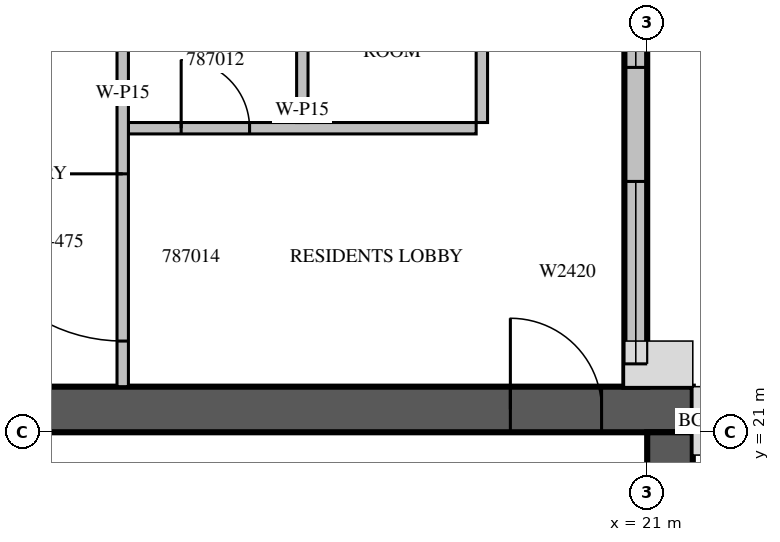
"""IFC4 building model, lengths in metres.
Left out: names, types, materials, properties, quantities, classifications, styles, units other than length and angle.
Written with IfcOpenShell. Run it as: python <this file> out.ifc"""

import sys

from ifc_helpers import new_model, si_unit, direction, frame, frame_2d, origin, place, context, subcontext, project, spatial, rectangle, extrude, source, transform, mapped, element, fill, save


model = new_model("IFC4")
c1 = context("Model", 3, precision=1e-05, world=origin(), true_north=direction((0.0, 1.0)))
c2 = subcontext(c1, "Body", "Model", "MODEL_VIEW")
j1 = project(units=[si_unit("LENGTHUNIT", "METRE"), si_unit("PLANEANGLEUNIT", "RADIAN")], contexts=[c1])
p1 = place(None, origin())
s1 = spatial("IfcSite", under=j1, at=p1, CompositionType="ELEMENT")
p2 = place(p1, origin())
s2 = spatial("IfcBuilding", under=s1, at=p2, CompositionType="ELEMENT")
p3 = place(p2, frame((0.0, 0.0, 365.0)))
s3 = spatial("IfcBuildingStorey", under=s2, at=p3, CompositionType="ELEMENT", Elevation=365.0)
m1 = source(origin(), c2, "Body", "SweptSolid", [
    extrude(rectangle(XDim=11.1, YDim=0.6, at=frame_2d((5.55, 0.0))), origin(), (0.0, 0.0, 1.0), 3.5),
])
p4 = place(p3, frame((10.5, 21.3, 0.0), z_axis=(0.0, 0.0, 1.0), x_axis=(1.0, 0.0, 0.0)))
e1 = element("IfcWall", 1, at=p4, inside=s3, PredefinedType="SHEAR", context=c2, shape_type="MappedRepresentation", body=[
    mapped(m1, transform((0.0, 0.0, 0.0), scale=1.0)),
])
m2 = source(origin(), c2, "Body", "SweptSolid", [
    extrude(rectangle(XDim=1.2, YDim=2.1, at=frame_2d((0.6, 1.05))), frame((0.0, 0.31, 0.0), z_axis=(0.0, -1.0, 0.0), x_axis=(1.0, 0.0, 0.0)), (0.0, 0.0, 1.0), 0.62),
])
p5 = place(p4, frame((8.7, 0.0, 0.0)))
e2 = element("IfcOpeningElement", 2, at=p5, cuts=e1, PredefinedType="OPENING", context=c2, shape_type="MappedRepresentation", body=[
    mapped(m2, transform((0.0, 0.0, 0.0), scale=1.0)),
])
m3 = source(origin(), c2, "Body", "SweptSolid", [
    extrude(rectangle(XDim=10.5, YDim=0.6, at=frame_2d((5.25, 0.0))), origin(), (0.0, 0.0, 1.0), 3.5),
])
p6 = place(p3, frame((21.3, 10.5, 0.0), z_axis=(0.0, 0.0, 1.0), x_axis=(0.0, 1.0, 0.0)))
e3 = element("IfcWall", 3, at=p6, inside=s3, PredefinedType="SHEAR", context=c2, shape_type="MappedRepresentation", body=[
    mapped(m3, transform((0.0, 0.0, 0.0), scale=1.0)),
])
m4 = source(origin(), c2, "Body", "SweptSolid", [
    extrude(rectangle(XDim=1.2, YDim=2.4, at=frame_2d((0.6, 1.2))), frame((0.0, 0.31, 0.0), z_axis=(0.0, -1.0, 0.0), x_axis=(1.0, 0.0, 0.0)), (0.0, 0.0, 1.0), 0.62),
])
p7 = place(p6, frame((5.7, 0.0, 0.6)))
e4 = element("IfcOpeningElement", 4, at=p7, cuts=e3, PredefinedType="OPENING", context=c2, shape_type="MappedRepresentation", body=[
    mapped(m4, transform((0.0, 0.0, 0.0), scale=1.0)),
])
m5 = source(origin(), c2, "Body", "SweptSolid", [
    extrude(rectangle(XDim=7.5, YDim=0.3, at=frame_2d((3.75, 0.0))), origin(), (0.0, 0.0, 1.0), 3.05),
])
p8 = place(p3, frame((20.85, 21.6, 0.0), z_axis=(0.0, 0.0, 1.0), x_axis=(0.0, 1.0, 0.0)))
e5 = element("IfcWall", 5, at=p8, inside=s3, PredefinedType="STANDARD", context=c2, shape_type="MappedRepresentation", body=[
    mapped(m5, transform((0.0, 0.0, 0.0), scale=1.0)),
])
m6 = source(origin(), c2, "Body", "SweptSolid", [
    extrude(rectangle(XDim=2.4, YDim=2.0, at=frame_2d((1.2, 1.0))), frame((0.0, 0.16, 0.0), z_axis=(0.0, -1.0, 0.0), x_axis=(1.0, 0.0, 0.0)), (0.0, 0.0, 1.0), 0.32),
])
p9 = place(p8, frame((0.3, 0.0, 0.6)))
e6 = element("IfcOpeningElement", 6, at=p9, cuts=e5, PredefinedType="OPENING", context=c2, shape_type="MappedRepresentation", body=[
    mapped(m6, transform((0.0, 0.0, 0.0), scale=1.0)),
])
m7 = source(origin(), c2, "Body", "SweptSolid", [
    extrude(rectangle(XDim=3.0, YDim=2.0, at=frame_2d((1.5, 1.0))), frame((0.0, 0.16, 0.0), z_axis=(0.0, -1.0, 0.0), x_axis=(1.0, 0.0, 0.0)), (0.0, 0.0, 1.0), 0.32),
])
p10 = place(p8, frame((4.2, 0.0, 0.6)))
e7 = element("IfcOpeningElement", 7, at=p10, cuts=e5, PredefinedType="OPENING", context=c2, shape_type="MappedRepresentation", body=[
    mapped(m7, transform((0.0, 0.0, 0.0), scale=1.0)),
])
m8 = source(origin(), c2, "Body", "SweptSolid", [
    extrude(rectangle(XDim=4.575, YDim=0.15, at=frame_2d((2.288, 0.0))), origin(), (0.0, 0.0, 1.0), 3.05),
])
p11 = place(p3, frame((14.175, 25.0, 0.0), z_axis=(0.0, 0.0, 1.0), x_axis=(1.0, 0.0, 0.0)))
e8 = element("IfcWall", 8, at=p11, inside=s3, PredefinedType="PARTITIONING", context=c2, shape_type="MappedRepresentation", body=[
    mapped(m8, transform((0.0, 0.0, 0.0), scale=1.0)),
])
m9 = source(origin(), c2, "Body", "SweptSolid", [
    extrude(rectangle(XDim=0.9, YDim=2.1, at=frame_2d((0.45, 1.05))), frame((0.0, 0.085, 0.0), z_axis=(0.0, -1.0, 0.0), x_axis=(1.0, 0.0, 0.0)), (0.0, 0.0, 1.0), 0.17),
])
p12 = place(p11, frame((0.694, 0.0, 0.0)))
e9 = element("IfcOpeningElement", 9, at=p12, cuts=e8, PredefinedType="OPENING", context=c2, shape_type="MappedRepresentation", body=[
    mapped(m9, transform((0.0, 0.0, 0.0), scale=1.0)),
])
m10 = source(origin(), c2, "Body", "SweptSolid", [
    extrude(rectangle(XDim=4.25, YDim=0.15, at=frame_2d((2.125, 0.0))), origin(), (0.0, 0.0, 1.0), 3.05),
])
p13 = place(p3, frame((18.825, 25.075, 0.0), z_axis=(0.0, 0.0, 1.0), x_axis=(0.0, 1.0, 0.0)))
e10 = element("IfcWall", 10, at=p13, inside=s3, PredefinedType="PARTITIONING", context=c2, shape_type="MappedRepresentation", body=[
    mapped(m10, transform((0.0, 0.0, 0.0), scale=1.0)),
])
m11 = source(origin(), c2, "Body", "SweptSolid", [
    extrude(rectangle(XDim=1.0, YDim=2.1, at=frame_2d((0.5, 1.05))), frame((0.0, 0.085, 0.0), z_axis=(0.0, -1.0, 0.0), x_axis=(1.0, 0.0, 0.0)), (0.0, 0.0, 1.0), 0.17),
])
p14 = place(p13, frame((1.625, 0.0, 0.0)))
e11 = element("IfcOpeningElement", 11, at=p14, cuts=e10, PredefinedType="OPENING", context=c2, shape_type="MappedRepresentation", body=[
    mapped(m11, transform((0.0, 0.0, 0.0), scale=1.0)),
])
p15 = place(p3, frame((16.463, 25.075, 0.0), z_axis=(0.0, 0.0, 1.0), x_axis=(0.0, 1.0, 0.0)))
e12 = element("IfcWall", 12, at=p15, inside=s3, PredefinedType="PARTITIONING", context=c2, shape_type="MappedRepresentation", body=[
    mapped(m10, transform((0.0, 0.0, 0.0), scale=1.0)),
])
m12 = source(origin(), c2, "Body", "SweptSolid", [
    extrude(rectangle(XDim=7.725, YDim=0.15, at=frame_2d((3.862, 0.0))), origin(), (0.0, 0.0, 1.0), 3.05),
])
p16 = place(p3, frame((14.1, 29.325, 0.0), z_axis=(0.0, 0.0, 1.0), x_axis=(0.0, -1.0, 0.0)))
e13 = element("IfcWall", 13, at=p16, inside=s3, PredefinedType="PARTITIONING", context=c2, shape_type="MappedRepresentation", body=[
    mapped(m12, transform((0.0, 0.0, 0.0), scale=1.0)),
])
m13 = source(origin(), c2, "Body", "SweptSolid", [
    extrude(rectangle(XDim=2.2, YDim=2.1, at=frame_2d((1.1, 1.05))), frame((0.0, 0.085, 0.0), z_axis=(0.0, -1.0, 0.0), x_axis=(1.0, 0.0, 0.0)), (0.0, 0.0, 1.0), 0.17),
])
p17 = place(p16, frame((4.925, 0.0, 0.0)))
e14 = element("IfcOpeningElement", 14, at=p17, cuts=e13, PredefinedType="OPENING", context=c2, shape_type="MappedRepresentation", body=[
    mapped(m13, transform((0.0, 0.0, 0.0), scale=1.0)),
])
m14 = source(origin(), c2, "Body", "SweptSolid", [
    extrude(rectangle(XDim=2.4, YDim=2.0, at=frame_2d((1.2, 1.0))), frame((0.0, 0.03, 0.0), z_axis=(0.0, -1.0, 0.0), x_axis=(1.0, 0.0, 0.0)), (0.0, 0.0, 1.0), 0.06),
])
p18 = place(p9, origin())
e15 = element("IfcWindow", 15, at=p18, inside=s3, PartitioningType="SINGLE_PANEL", PredefinedType="WINDOW", context=c2, shape_type="MappedRepresentation", body=[
    mapped(m14, transform((0.0, 0.0, 0.0), scale=1.0)),
])
fill(e6, e15)
m15 = source(origin(), c2, "Body", "SweptSolid", [
    extrude(rectangle(XDim=3.0, YDim=2.0, at=frame_2d((1.5, 1.0))), frame((0.0, 0.03, 0.0), z_axis=(0.0, -1.0, 0.0), x_axis=(1.0, 0.0, 0.0)), (0.0, 0.0, 1.0), 0.06),
])
p19 = place(p10, origin())
e16 = element("IfcWindow", 16, at=p19, inside=s3, PartitioningType="SINGLE_PANEL", PredefinedType="WINDOW", context=c2, shape_type="MappedRepresentation", body=[
    mapped(m15, transform((0.0, 0.0, 0.0), scale=1.0)),
])
fill(e7, e16)
m16 = source(origin(), c2, "Body", "SweptSolid", [
    extrude(rectangle(XDim=1.2, YDim=2.1, at=frame_2d((0.6, 1.05))), frame((0.0, 0.025, 0.0), z_axis=(0.0, -1.0, 0.0), x_axis=(1.0, 0.0, 0.0)), (0.0, 0.0, 1.0), 0.05),
])
p20 = place(p5, origin())
e17 = element("IfcDoor", 17, at=p20, inside=s3, OperationType="SINGLE_SWING_LEFT", PredefinedType="DOOR", context=c2, shape_type="MappedRepresentation", body=[
    mapped(m16, transform((0.0, 0.0, 0.0), scale=1.0)),
])
fill(e2, e17)
m17 = source(origin(), c2, "Body", "SweptSolid", [
    extrude(rectangle(XDim=0.9, YDim=2.1, at=frame_2d((0.45, 1.05))), frame((0.0, 0.025, 0.0), z_axis=(0.0, -1.0, 0.0), x_axis=(1.0, 0.0, 0.0)), (0.0, 0.0, 1.0), 0.05),
])
p21 = place(p12, origin())
e18 = element("IfcDoor", 18, at=p21, inside=s3, OperationType="SINGLE_SWING_LEFT", PredefinedType="DOOR", context=c2, shape_type="MappedRepresentation", body=[
    mapped(m17, transform((0.0, 0.0, 0.0), scale=1.0)),
])
fill(e9, e18)
m18 = source(origin(), c2, "Body", "SweptSolid", [
    extrude(rectangle(XDim=2.2, YDim=2.1, at=frame_2d((1.1, 1.05))), frame((0.0, 0.025, 0.0), z_axis=(0.0, -1.0, 0.0), x_axis=(1.0, 0.0, 0.0)), (0.0, 0.0, 1.0), 0.05),
])
p22 = place(p17, origin())
e19 = element("IfcDoor", 19, at=p22, inside=s3, OperationType="DOUBLE_DOOR_SINGLE_SWING", PredefinedType="DOOR", context=c2, shape_type="MappedRepresentation", body=[
    mapped(m18, transform((0.0, 0.0, 0.0), scale=1.0)),
])
fill(e14, e19)
save(model, sys.argv[1])
